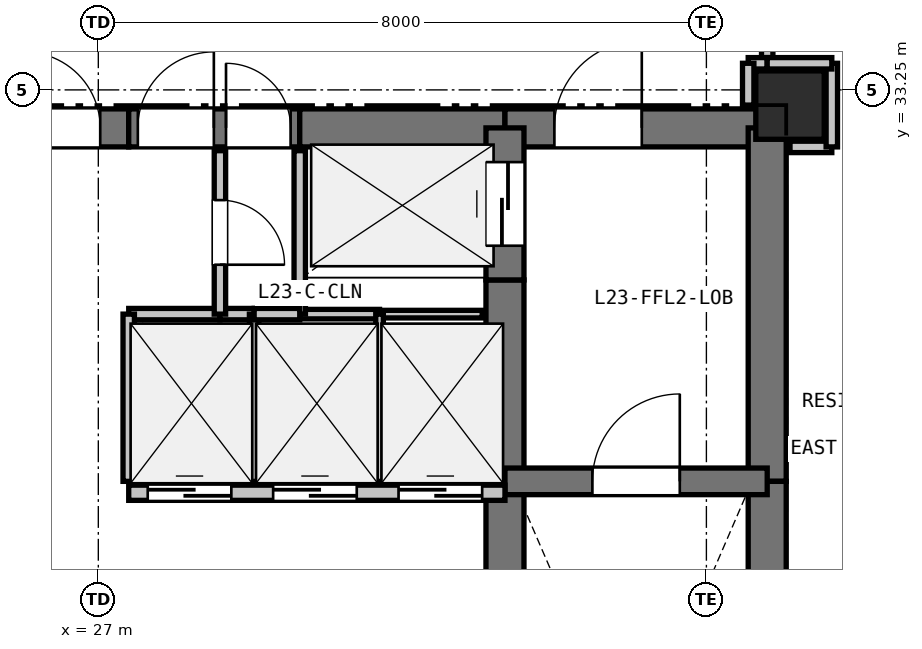
"""IFC4 building model, lengths in metres.
Left out: names, types, materials, properties, quantities, classifications, styles, units other than length and angle.
Written with IfcOpenShell. Run it as: python <this file> out.ifc"""

import sys

from ifc_helpers import new_model, si_unit, direction, frame, frame_2d, origin, origin_2d, place, context, subcontext, project, spatial, rectangle, extrude, element, fill, save


model = new_model("IFC4")
c1 = context("Model", 3, precision=1e-05, world=origin(), true_north=direction((0.0, 1.0)))
c2 = subcontext(c1, "Body", "Model", "MODEL_VIEW")
j1 = project(units=[si_unit("LENGTHUNIT", "METRE"), si_unit("PLANEANGLEUNIT", "RADIAN")], contexts=[c1])
p1 = place(None, origin())
s1 = spatial("IfcSite", under=j1, at=p1, CompositionType="ELEMENT")
p2 = place(p1, origin())
s2 = spatial("IfcBuilding", under=s1, at=p2, CompositionType="ELEMENT")
p3 = place(p2, frame((0.0, 0.0, 86.7)))
s3 = spatial("IfcBuildingStorey", under=s2, at=p3, CompositionType="ELEMENT", Elevation=86.7)
p4 = place(p3, frame((36.1, 33.05, 0.0), z_axis=(0.0, 0.0, 1.0), x_axis=(1.0, 0.0, 0.0)))
e1 = element("IfcColumn", 1, at=p4, inside=s3, PredefinedType="COLUMN", context=c2, shape_type="SweptSolid", body=[
    extrude(rectangle(XDim=0.9, YDim=0.9, at=origin_2d()), origin(), (0.0, 0.0, 1.0), 3.3),
])
p5 = place(p3, frame((25.65, 32.75, 0.0), z_axis=(0.0, 0.0, 1.0), x_axis=(1.0, 0.0, 0.0)))
e2 = element("IfcWall", 2, at=p5, inside=s3, PredefinedType="SHEAR", context=c2, shape_type="SweptSolid", body=[
    extrude(rectangle(XDim=1.75, YDim=0.5, at=frame_2d((0.875, 0.0))), origin(), (0.0, 0.0, 1.0), 3.05),
])
p6 = place(p5, frame((0.375, 0.0, 0.0)))
e3 = element("IfcOpeningElement", 3, at=p6, cuts=e2, PredefinedType="OPENING", context=c2, shape_type="SweptSolid", body=[
    extrude(rectangle(XDim=1.0, YDim=2.15, at=frame_2d((0.5, 1.075))), frame((0.0, 0.26, 0.0), z_axis=(0.0, -1.0, 0.0), x_axis=(1.0, 0.0, 0.0)), (0.0, 0.0, 1.0), 0.52),
])
p7 = place(p3, frame((27.4, 32.75, 0.0), z_axis=(0.0, 0.0, 1.0), x_axis=(1.0, 0.0, 0.0)))
e4 = element("IfcWall", 4, at=p7, inside=s3, PredefinedType="SHEAR", context=c2, shape_type="SweptSolid", body=[
    extrude(rectangle(XDim=2.25, YDim=0.5, at=frame_2d((1.125, 0.0))), origin(), (0.0, 0.0, 1.0), 3.05),
])
p8 = place(p7, frame((0.12, 0.0, 0.0)))
e5 = element("IfcOpeningElement", 5, at=p8, cuts=e4, PredefinedType="OPENING", context=c2, shape_type="SweptSolid", body=[
    extrude(rectangle(XDim=1.0, YDim=2.15, at=frame_2d((0.5, 1.075))), frame((0.0, 0.26, 0.0), z_axis=(0.0, -1.0, 0.0), x_axis=(1.0, 0.0, 0.0)), (0.0, 0.0, 1.0), 0.52),
])
p9 = place(p7, frame((1.28, 0.0, 0.0)))
e6 = element("IfcOpeningElement", 6, at=p9, cuts=e4, PredefinedType="OPENING", context=c2, shape_type="SweptSolid", body=[
    extrude(rectangle(XDim=0.85, YDim=2.1, at=frame_2d((0.425, 1.05))), frame((0.0, 0.26, 0.0), z_axis=(0.0, -1.0, 0.0), x_axis=(1.0, 0.0, 0.0)), (0.0, 0.0, 1.0), 0.52),
])
p10 = place(p3, frame((29.65, 32.75, 0.0), z_axis=(0.0, 0.0, 1.0), x_axis=(1.0, 0.0, 0.0)))
e7 = element("IfcWall", 7, at=p10, inside=s3, PredefinedType="SHEAR", context=c2, shape_type="SweptSolid", body=[
    extrude(rectangle(XDim=2.7, YDim=0.5, at=frame_2d((1.35, 0.0))), origin(), (0.0, 0.0, 1.0), 3.05),
])
p11 = place(p3, frame((32.35, 32.75, 0.0), z_axis=(0.0, 0.0, 1.0), x_axis=(1.0, 0.0, 0.0)))
e8 = element("IfcWall", 8, at=p11, inside=s3, PredefinedType="SHEAR", context=c2, shape_type="SweptSolid", body=[
    extrude(rectangle(XDim=3.45, YDim=0.5, at=frame_2d((1.725, 0.0))), origin(), (0.0, 0.0, 1.0), 3.05),
])
p12 = place(p11, frame((0.65, 0.0, 0.0)))
e9 = element("IfcOpeningElement", 9, at=p12, cuts=e8, PredefinedType="OPENING", context=c2, shape_type="SweptSolid", body=[
    extrude(rectangle(XDim=1.15, YDim=2.15, at=frame_2d((0.575, 1.075))), frame((0.0, 0.26, 0.0), z_axis=(0.0, -1.0, 0.0), x_axis=(1.0, 0.0, 0.0)), (0.0, 0.0, 1.0), 0.52),
])
p13 = place(p3, frame((35.8, 32.75, 0.0), z_axis=(0.0, 0.0, 1.0), x_axis=(0.0, -1.0, 0.0)))
e10 = element("IfcWall", 10, at=p13, inside=s3, PredefinedType="SHEAR", context=c2, shape_type="SweptSolid", body=[
    extrude(rectangle(XDim=4.65, YDim=0.5, at=frame_2d((2.325, 0.0))), origin(), (0.0, 0.0, 1.0), 3.05),
])
p14 = place(p3, frame((35.8, 28.1, 0.0), z_axis=(0.0, 0.0, 1.0), x_axis=(0.0, -1.0, 0.0)))
e11 = element("IfcWall", 11, at=p14, inside=s3, PredefinedType="SHEAR", context=c2, shape_type="SweptSolid", body=[
    extrude(rectangle(XDim=7.35, YDim=0.5, at=frame_2d((3.675, 0.0))), origin(), (0.0, 0.0, 1.0), 3.05),
])
p15 = place(p3, frame((32.35, 25.55, 0.0), z_axis=(0.0, 0.0, 1.0), x_axis=(0.0, 1.0, 0.0)))
e12 = element("IfcWall", 12, at=p15, inside=s3, PredefinedType="SHEAR", context=c2, shape_type="SweptSolid", body=[
    extrude(rectangle(XDim=2.4, YDim=0.5, at=frame_2d((1.2, 0.0))), origin(), (0.0, 0.0, 1.0), 3.05),
])
p16 = place(p3, frame((32.35, 27.95, 0.0), z_axis=(0.0, 0.0, 1.0), x_axis=(0.0, 1.0, 0.0)))
e13 = element("IfcWall", 13, at=p16, inside=s3, PredefinedType="SHEAR", context=c2, shape_type="SweptSolid", body=[
    extrude(rectangle(XDim=2.8, YDim=0.5, at=frame_2d((1.4, 0.0))), origin(), (0.0, 0.0, 1.0), 3.05),
])
p17 = place(p3, frame((32.35, 30.75, 0.0), z_axis=(0.0, 0.0, 1.0), x_axis=(0.0, 1.0, 0.0)))
e14 = element("IfcWall", 14, at=p17, inside=s3, PredefinedType="SHEAR", context=c2, shape_type="SweptSolid", body=[
    extrude(rectangle(XDim=2.0, YDim=0.5, at=frame_2d((1.0, 0.0))), origin(), (0.0, 0.0, 1.0), 3.05),
])
p18 = place(p17, frame((0.45, 0.0, 0.0)))
e15 = element("IfcOpeningElement", 15, at=p18, cuts=e14, PredefinedType="OPENING", context=c2, shape_type="SweptSolid", body=[
    extrude(rectangle(XDim=1.1, YDim=2.15, at=frame_2d((0.55, 1.075))), frame((0.0, 0.26, 0.0), z_axis=(0.0, -1.0, 0.0), x_axis=(1.0, 0.0, 0.0)), (0.0, 0.0, 1.0), 0.52),
])
p19 = place(p3, frame((32.35, 28.1, 0.0), z_axis=(0.0, 0.0, 1.0), x_axis=(1.0, 0.0, 0.0)))
e16 = element("IfcWall", 16, at=p19, inside=s3, PredefinedType="SHEAR", context=c2, shape_type="SweptSolid", body=[
    extrude(rectangle(XDim=3.45, YDim=0.35, at=frame_2d((1.725, 0.0))), origin(), (0.0, 0.0, 1.0), 3.05),
])
p20 = place(p19, frame((1.15, 0.0, 0.0)))
e17 = element("IfcOpeningElement", 17, at=p20, cuts=e16, PredefinedType="OPENING", context=c2, shape_type="SweptSolid", body=[
    extrude(rectangle(XDim=1.15, YDim=2.15, at=frame_2d((0.575, 1.075))), frame((0.0, 0.185, 0.0), z_axis=(0.0, -1.0, 0.0), x_axis=(1.0, 0.0, 0.0)), (0.0, 0.0, 1.0), 0.37),
])
p21 = place(p3, frame((27.4, 27.95, 0.0), z_axis=(0.0, 0.0, 1.0), x_axis=(1.0, 0.0, 0.0)))
e18 = element("IfcWall", 18, at=p21, inside=s3, PredefinedType="PARTITIONING", context=c2, shape_type="SweptSolid", body=[
    extrude(rectangle(XDim=4.95, YDim=0.2, at=frame_2d((2.475, 0.0))), origin(), (0.0, 0.0, 1.0), 3.05),
])
p22 = place(p21, frame((0.25, 0.0, 0.0)))
e19 = element("IfcOpeningElement", 19, at=p22, cuts=e18, PredefinedType="OPENING", context=c2, shape_type="SweptSolid", body=[
    extrude(rectangle(XDim=1.1, YDim=2.15, at=frame_2d((0.55, 1.075))), frame((0.0, 0.11, 0.0), z_axis=(0.0, -1.0, 0.0), x_axis=(1.0, 0.0, 0.0)), (0.0, 0.0, 1.0), 0.22),
])
p23 = place(p21, frame((1.9, 0.0, 0.0)))
e20 = element("IfcOpeningElement", 20, at=p23, cuts=e18, PredefinedType="OPENING", context=c2, shape_type="SweptSolid", body=[
    extrude(rectangle(XDim=1.1, YDim=2.15, at=frame_2d((0.55, 1.075))), frame((0.0, 0.11, 0.0), z_axis=(0.0, -1.0, 0.0), x_axis=(1.0, 0.0, 0.0)), (0.0, 0.0, 1.0), 0.22),
])
p24 = place(p21, frame((3.55, 0.0, 0.0)))
e21 = element("IfcOpeningElement", 21, at=p24, cuts=e18, PredefinedType="OPENING", context=c2, shape_type="SweptSolid", body=[
    extrude(rectangle(XDim=1.1, YDim=2.15, at=frame_2d((0.55, 1.075))), frame((0.0, 0.11, 0.0), z_axis=(0.0, -1.0, 0.0), x_axis=(1.0, 0.0, 0.0)), (0.0, 0.0, 1.0), 0.22),
])
p25 = place(p3, frame((32.05, 30.3, 0.0), z_axis=(0.0, 0.0, 1.0), x_axis=(-1.0, 0.0, 0.0)))
e22 = element("IfcWall", 22, at=p25, inside=s3, PredefinedType="PARTITIONING", context=c2, shape_type="SweptSolid", body=[
    extrude(rectangle(XDim=1.35, YDim=0.1, at=frame_2d((0.675, 0.0))), origin(), (0.0, 0.0, 1.0), 3.05),
])
p26 = place(p3, frame((30.7, 30.3, 0.0), z_axis=(0.0, 0.0, 1.0), x_axis=(-1.0, 0.0, 0.0)))
e23 = element("IfcWall", 23, at=p26, inside=s3, PredefinedType="PARTITIONING", context=c2, shape_type="SweptSolid", body=[
    extrude(rectangle(XDim=1.05, YDim=0.125, at=frame_2d((0.525, 0.0))), origin(), (0.0, 0.0, 1.0), 3.05),
])
p27 = place(p3, frame((29.65, 30.3, 0.0), z_axis=(0.0, 0.0, 1.0), x_axis=(0.0, 1.0, 0.0)))
e24 = element("IfcWall", 24, at=p27, inside=s3, PredefinedType="PARTITIONING", context=c2, shape_type="SweptSolid", body=[
    extrude(rectangle(XDim=2.15, YDim=0.15, at=frame_2d((1.075, 0.0))), origin(), (0.0, 0.0, 1.0), 3.05),
])
p28 = place(p3, frame((27.4, 30.3, 0.0), z_axis=(0.0, 0.0, 1.0), x_axis=(1.0, 0.0, 0.0)))
e25 = element("IfcWall", 25, at=p28, inside=s3, PredefinedType="PARTITIONING", context=c2, shape_type="SweptSolid", body=[
    extrude(rectangle(XDim=1.2, YDim=0.15, at=frame_2d((0.6, 0.0))), origin(), (0.0, 0.0, 1.0), 3.05),
])
p29 = place(p3, frame((28.6, 30.3, 0.0), z_axis=(0.0, 0.0, 1.0), x_axis=(1.0, 0.0, 0.0)))
e26 = element("IfcWall", 26, at=p29, inside=s3, PredefinedType="PARTITIONING", context=c2, shape_type="SweptSolid", body=[
    extrude(rectangle(XDim=0.45, YDim=0.15, at=frame_2d((0.225, 0.0))), origin(), (0.0, 0.0, 1.0), 3.05),
])
p30 = place(p3, frame((29.05, 30.3, 0.0), z_axis=(0.0, 0.0, 1.0), x_axis=(0.0, -1.0, 0.0)))
e27 = element("IfcWall", 27, at=p30, inside=s3, PredefinedType="PARTITIONING", context=c2, shape_type="SweptSolid", body=[
    extrude(rectangle(XDim=2.2, YDim=0.125, at=frame_2d((1.1, 0.0))), origin(), (0.0, 0.0, 1.0), 3.05),
])
p31 = place(p3, frame((27.4, 28.1, 0.0), z_axis=(0.0, 0.0, 1.0), x_axis=(0.0, 1.0, 0.0)))
e28 = element("IfcWall", 28, at=p31, inside=s3, PredefinedType="PARTITIONING", context=c2, shape_type="SweptSolid", body=[
    extrude(rectangle(XDim=2.2, YDim=0.15, at=frame_2d((1.1, 0.0))), origin(), (0.0, 0.0, 1.0), 3.05),
])
p32 = place(p3, frame((29.05, 30.3, 0.0), z_axis=(0.0, 0.0, 1.0), x_axis=(1.0, 0.0, 0.0)))
e29 = element("IfcWall", 29, at=p32, inside=s3, PredefinedType="PARTITIONING", context=c2, shape_type="SweptSolid", body=[
    extrude(rectangle(XDim=0.6, YDim=0.15, at=frame_2d((0.3, 0.0))), origin(), (0.0, 0.0, 1.0), 3.05),
])
p33 = place(p3, frame((30.7, 30.3, 0.0), z_axis=(0.0, 0.0, 1.0), x_axis=(0.0, -1.0, 0.0)))
e30 = element("IfcWall", 30, at=p33, inside=s3, PredefinedType="PARTITIONING", context=c2, shape_type="SweptSolid", body=[
    extrude(rectangle(XDim=2.2, YDim=0.1, at=frame_2d((1.1, 0.0))), origin(), (0.0, 0.0, 1.0), 3.05),
])
p34 = place(p3, frame((28.6, 32.45, 0.0), z_axis=(0.0, 0.0, 1.0), x_axis=(0.0, -1.0, 0.0)))
e31 = element("IfcWall", 31, at=p34, inside=s3, PredefinedType="PARTITIONING", context=c2, shape_type="SweptSolid", body=[
    extrude(rectangle(XDim=2.15, YDim=0.15, at=frame_2d((1.075, 0.0))), origin(), (0.0, 0.0, 1.0), 3.05),
])
p35 = place(p34, frame((0.65, 0.0, 0.0)))
e32 = element("IfcOpeningElement", 32, at=p35, cuts=e31, PredefinedType="OPENING", context=c2, shape_type="SweptSolid", body=[
    extrude(rectangle(XDim=0.85, YDim=2.1, at=frame_2d((0.425, 1.05))), frame((0.0, 0.085, 0.0), z_axis=(0.0, -1.0, 0.0), x_axis=(1.0, 0.0, 0.0)), (0.0, 0.0, 1.0), 0.17),
])
p36 = place(p3, frame((35.8, 35.35, 0.0), z_axis=(0.0, 0.0, 1.0), x_axis=(0.0, -1.0, 0.0)))
e33 = element("IfcWall", 33, at=p36, inside=s3, PredefinedType="PARTITIONING", context=c2, shape_type="SweptSolid", body=[
    extrude(rectangle(XDim=1.75, YDim=0.15, at=frame_2d((0.875, 0.0))), origin(), (0.0, 0.0, 1.0), 3.05),
])
p37 = place(p36, frame((0.375, 0.0, 0.0)))
e34 = element("IfcOpeningElement", 34, at=p37, cuts=e33, PredefinedType="OPENING", context=c2, shape_type="SweptSolid", body=[
    extrude(rectangle(XDim=1.0, YDim=2.15, at=frame_2d((0.5, 1.075))), frame((0.0, 0.085, 0.0), z_axis=(0.0, -1.0, 0.0), x_axis=(1.0, 0.0, 0.0)), (0.0, 0.0, 1.0), 0.17),
])
p38 = place(p3, frame((35.8, 33.6, 0.0), z_axis=(0.0, 0.0, 1.0), x_axis=(-1.0, 0.0, 0.0)))
e35 = element("IfcWall", 35, at=p38, inside=s3, PredefinedType="PARTITIONING", context=c2, shape_type="SweptSolid", body=[
    extrude(rectangle(XDim=0.25, YDim=0.15, at=frame_2d((0.125, 0.0))), origin(), (0.0, 0.0, 1.0), 3.05),
])
p39 = place(p3, frame((35.55, 33.6, 0.0), z_axis=(0.0, 0.0, 1.0), x_axis=(0.0, -1.0, 0.0)))
e36 = element("IfcWall", 36, at=p39, inside=s3, PredefinedType="PARTITIONING", context=c2, shape_type="SweptSolid", body=[
    extrude(rectangle(XDim=0.55, YDim=0.15, at=frame_2d((0.275, 0.0))), origin(), (0.0, 0.0, 1.0), 2.498),
])
p40 = place(p3, frame((36.1, 32.5, 0.0), z_axis=(0.0, 0.0, 1.0), x_axis=(1.0, 0.0, 0.0)))
e37 = element("IfcWall", 37, at=p40, inside=s3, PredefinedType="PARTITIONING", context=c2, shape_type="SweptSolid", body=[
    extrude(rectangle(XDim=0.55, YDim=0.15, at=frame_2d((0.275, 0.0))), origin(), (0.0, 0.0, 1.0), 2.498),
])
p41 = place(p3, frame((36.65, 32.5, 0.0), z_axis=(0.0, 0.0, 1.0), x_axis=(0.0, 1.0, 0.0)))
e38 = element("IfcWall", 38, at=p41, inside=s3, PredefinedType="PARTITIONING", context=c2, shape_type="SweptSolid", body=[
    extrude(rectangle(XDim=1.1, YDim=0.15, at=frame_2d((0.55, 0.0))), origin(), (0.0, 0.0, 1.0), 2.423),
])
p42 = place(p3, frame((36.65, 33.6, 0.0), z_axis=(0.0, 0.0, 1.0), x_axis=(-1.0, 0.0, 0.0)))
e39 = element("IfcWall", 39, at=p42, inside=s3, PredefinedType="PARTITIONING", context=c2, shape_type="SweptSolid", body=[
    extrude(rectangle(XDim=0.85, YDim=0.15, at=frame_2d((0.425, 0.0))), origin(), (0.0, 0.0, 1.0), 2.423),
])
p43 = place(p22, origin())
e40 = element("IfcDoor", 40, at=p43, inside=s3, OperationType="SLIDING_TO_LEFT", PredefinedType="DOOR", context=c2, shape_type="SweptSolid", body=[
    extrude(rectangle(XDim=1.1, YDim=2.15, at=frame_2d((0.55, 1.075))), frame((0.0, 0.025, 0.0), z_axis=(0.0, -1.0, 0.0), x_axis=(1.0, 0.0, 0.0)), (0.0, 0.0, 1.0), 0.05),
])
fill(e19, e40)
p44 = place(p23, origin())
e41 = element("IfcDoor", 41, at=p44, inside=s3, OperationType="SLIDING_TO_LEFT", PredefinedType="DOOR", context=c2, shape_type="SweptSolid", body=[
    extrude(rectangle(XDim=1.1, YDim=2.15, at=frame_2d((0.55, 1.075))), frame((0.0, 0.025, 0.0), z_axis=(0.0, -1.0, 0.0), x_axis=(1.0, 0.0, 0.0)), (0.0, 0.0, 1.0), 0.05),
])
fill(e20, e41)
p45 = place(p24, origin())
e42 = element("IfcDoor", 42, at=p45, inside=s3, OperationType="SLIDING_TO_LEFT", PredefinedType="DOOR", context=c2, shape_type="SweptSolid", body=[
    extrude(rectangle(XDim=1.1, YDim=2.15, at=frame_2d((0.55, 1.075))), frame((0.0, 0.025, 0.0), z_axis=(0.0, -1.0, 0.0), x_axis=(1.0, 0.0, 0.0)), (0.0, 0.0, 1.0), 0.05),
])
fill(e21, e42)
p46 = place(p6, origin())
e43 = element("IfcDoor", 43, at=p46, inside=s3, OperationType="SINGLE_SWING_LEFT", PredefinedType="DOOR", context=c2, shape_type="SweptSolid", body=[
    extrude(rectangle(XDim=1.0, YDim=2.15, at=frame_2d((0.5, 1.075))), frame((0.0, 0.025, 0.0), z_axis=(0.0, -1.0, 0.0), x_axis=(1.0, 0.0, 0.0)), (0.0, 0.0, 1.0), 0.05),
])
fill(e3, e43)
p47 = place(p18, origin())
e44 = element("IfcDoor", 44, at=p47, inside=s3, OperationType="SLIDING_TO_LEFT", PredefinedType="DOOR", context=c2, shape_type="SweptSolid", body=[
    extrude(rectangle(XDim=1.1, YDim=2.15, at=frame_2d((0.55, 1.075))), frame((0.0, 0.025, 0.0), z_axis=(0.0, -1.0, 0.0), x_axis=(1.0, 0.0, 0.0)), (0.0, 0.0, 1.0), 0.05),
])
fill(e15, e44)
p48 = place(p20, origin())
e45 = element("IfcDoor", 45, at=p48, inside=s3, OperationType="SINGLE_SWING_RIGHT", PredefinedType="DOOR", context=c2, shape_type="SweptSolid", body=[
    extrude(rectangle(XDim=1.15, YDim=2.15, at=frame_2d((0.575, 1.075))), frame((0.0, 0.025, 0.0), z_axis=(0.0, -1.0, 0.0), x_axis=(1.0, 0.0, 0.0)), (0.0, 0.0, 1.0), 0.05),
])
fill(e17, e45)
p49 = place(p12, origin())
e46 = element("IfcDoor", 46, at=p49, inside=s3, OperationType="SINGLE_SWING_RIGHT", PredefinedType="DOOR", context=c2, shape_type="SweptSolid", body=[
    extrude(rectangle(XDim=1.15, YDim=2.15, at=frame_2d((0.575, 1.075))), frame((0.0, 0.025, 0.0), z_axis=(0.0, -1.0, 0.0), x_axis=(1.0, 0.0, 0.0)), (0.0, 0.0, 1.0), 0.05),
])
fill(e9, e46)
p50 = place(p8, origin())
e47 = element("IfcDoor", 47, at=p50, inside=s3, OperationType="SINGLE_SWING_RIGHT", PredefinedType="DOOR", context=c2, shape_type="SweptSolid", body=[
    extrude(rectangle(XDim=1.0, YDim=2.15, at=frame_2d((0.5, 1.075))), frame((0.0, 0.025, 0.0), z_axis=(0.0, -1.0, 0.0), x_axis=(1.0, 0.0, 0.0)), (0.0, 0.0, 1.0), 0.05),
])
fill(e5, e47)
p51 = place(p35, origin())
e48 = element("IfcDoor", 48, at=p51, inside=s3, OperationType="SINGLE_SWING_RIGHT", PredefinedType="DOOR", context=c2, shape_type="SweptSolid", body=[
    extrude(rectangle(XDim=0.85, YDim=2.1, at=frame_2d((0.425, 1.05))), frame((0.0, 0.025, 0.0), z_axis=(0.0, -1.0, 0.0), x_axis=(1.0, 0.0, 0.0)), (0.0, 0.0, 1.0), 0.05),
])
fill(e32, e48)
p52 = place(p9, origin())
e49 = element("IfcDoor", 49, at=p52, inside=s3, OperationType="SINGLE_SWING_LEFT", PredefinedType="DOOR", context=c2, shape_type="SweptSolid", body=[
    extrude(rectangle(XDim=0.85, YDim=2.1, at=frame_2d((0.425, 1.05))), frame((0.0, 0.025, 0.0), z_axis=(0.0, -1.0, 0.0), x_axis=(1.0, 0.0, 0.0)), (0.0, 0.0, 1.0), 0.05),
])
fill(e6, e49)
save(model, sys.argv[1])
